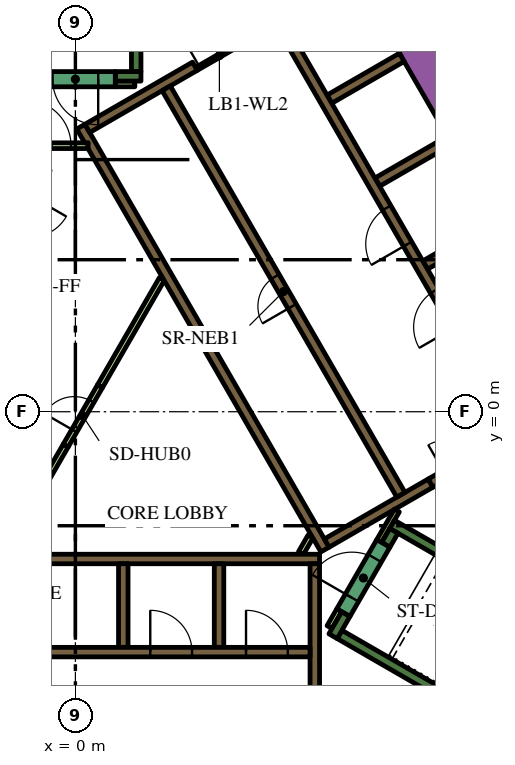
"""IFC4 building model, lengths in metres.
Left out: names, types, materials, properties, quantities, classifications, styles, units other than length and angle.
Written with IfcOpenShell. Run it as: python <this file> out.ifc"""

import sys

from ifc_helpers import new_model, si_unit, direction, frame, frame_2d, origin, place, context, subcontext, project, spatial, polyline, rectangle, outline, extrude, element, fill, save


model = new_model("IFC4")
c1 = context("Model", 3, precision=1e-05, world=origin(), true_north=direction((0.0, 1.0)))
c2 = subcontext(c1, "Body", "Model", "MODEL_VIEW")
j1 = project(units=[si_unit("LENGTHUNIT", "METRE"), si_unit("PLANEANGLEUNIT", "RADIAN")], contexts=[c1])
p1 = place(None, origin())
s1 = spatial("IfcSite", under=j1, at=p1, CompositionType="ELEMENT")
p2 = place(p1, origin())
s2 = spatial("IfcBuilding", under=s1, at=p2, CompositionType="ELEMENT")
p3 = place(p2, frame((0.0, 0.0, 83.7)))
s3 = spatial("IfcBuildingStorey", under=s2, at=p3, CompositionType="ELEMENT", Elevation=83.7)
p4 = place(p3, frame((6.776, 13.364, 0.0), z_axis=(0.0, 0.0, 1.0), x_axis=(0.500004177138, -0.8660229921, 0.0)))
e1 = element("IfcWall", 1, at=p4, inside=s3, PredefinedType="SOLIDWALL", context=c2, shape_type="SweptSolid", body=[
    extrude(rectangle(XDim=20.204, YDim=0.9, at=frame_2d((10.102, 0.0))), origin(), (0.0, 0.0, 1.0), 3.9),
])
p5 = place(p3, frame((12.84, -9.261, 0.0), z_axis=(0.0, 0.0, 1.0), x_axis=(-0.866013990052, 0.500019768644, 0.0)))
e2 = element("IfcWall", 2, at=p5, inside=s3, PredefinedType="SOLIDWALL", context=c2, shape_type="SweptSolid", body=[
    extrude(rectangle(XDim=6.8, YDim=0.25, at=frame_2d((3.4, 0.0))), origin(), (0.0, 0.0, 1.0), 3.9),
])
p6 = place(p3, frame((6.78, -5.906, 0.0), z_axis=(0.0, 0.0, 1.0), x_axis=(0.500223362819, 0.865896406789, 0.0)))
e3 = element("IfcWall", 3, at=p6, inside=s3, PredefinedType="SOLIDWALL", context=c2, shape_type="SweptSolid", body=[
    extrude(rectangle(XDim=0.675, YDim=0.25, at=frame_2d((0.337, 0.0))), origin(), (0.0, 0.0, 1.0), 3.9),
])
p7 = place(p3, frame((8.334, -2.964, 0.0), z_axis=(0.0, 0.0, 1.0), x_axis=(0.866016039709, -0.500016218704, 0.0)))
e4 = element("IfcWall", 4, at=p7, inside=s3, PredefinedType="SOLIDWALL", context=c2, shape_type="SweptSolid", body=[
    extrude(rectangle(XDim=7.05, YDim=0.25, at=frame_2d((3.525, 0.0))), origin(), (0.0, 0.0, 1.0), 3.9),
])
p8 = place(p3, frame((8.168, -3.503, 0.0), z_axis=(0.0, 0.0, 1.0), x_axis=(0.49972245349, 0.866185586049, 0.0)))
e5 = element("IfcWall", 5, at=p8, inside=s3, PredefinedType="SOLIDWALL", context=c2, shape_type="SweptSolid", body=[
    extrude(rectangle(XDim=0.425, YDim=0.25, at=frame_2d((0.212, 0.0))), origin(), (0.0, 0.0, 1.0), 3.9),
])
p9 = place(p3, frame((1.6, 8.95, 0.0), z_axis=(0.0, 0.0, 1.0), x_axis=(0.0, 1.0, 0.0)))
e6 = element("IfcWall", 6, at=p9, inside=s3, PredefinedType="SOLIDWALL", context=c2, shape_type="SweptSolid", body=[
    extrude(rectangle(XDim=6.8, YDim=0.25, at=frame_2d((3.4, 0.0))), origin(), (0.0, 0.0, 1.0), 3.9),
])
p10 = place(p3, frame((1.05, 8.825, 0.0), z_axis=(0.0, 0.0, 1.0), x_axis=(1.0, 0.0, 0.0)))
e7 = element("IfcWall", 7, at=p10, inside=s3, PredefinedType="SOLIDWALL", context=c2, shape_type="SweptSolid", body=[
    extrude(rectangle(XDim=0.675, YDim=0.25, at=frame_2d((0.337, 0.0))), origin(), (0.0, 0.0, 1.0), 3.9),
])
p11 = place(p3, frame((-5.845, -3.875, 0.0), z_axis=(0.0, 0.0, 1.0), x_axis=(1.0, 0.0, 0.0)))
e8 = element("IfcWall", 8, at=p11, inside=s3, PredefinedType="SOLIDWALL", context=c2, shape_type="SweptSolid", body=[
    extrude(rectangle(XDim=12.27, YDim=0.25, at=frame_2d((6.135, 0.0))), origin(), (0.0, 0.0, 1.0), 3.9),
])
p12 = place(p3, frame((6.3, -7.268, 0.0), z_axis=(0.0, 0.0, 1.0), x_axis=(0.0, 1.0, 0.0)))
e9 = element("IfcWall", 9, at=p12, inside=s3, PredefinedType="SOLIDWALL", context=c2, shape_type="SweptSolid", body=[
    extrude(rectangle(XDim=3.268, YDim=0.25, at=frame_2d((1.634, 0.0))), origin(), (0.0, 0.0, 1.0), 3.9),
])
for number, where, z_axis, x_axis in (
    (10, (3.78, -4.0, 0.0), (0.0, 0.0, 1.0), (0.0, -1.0, 0.0)),
    (11, (1.26, -4.0, 0.0), (0.0, 0.0, 1.0), (0.0, -1.0, 0.0)),
):
    element("IfcWall", number, at=place(p3, frame(where, z_axis=z_axis, x_axis=x_axis)), inside=s3, PredefinedType="SOLIDWALL", context=c2, shape_type="SweptSolid", body=[
        extrude(rectangle(XDim=2.2, YDim=0.25, at=frame_2d((1.1, 0.0))), origin(), (0.0, 0.0, 1.0), 3.9),
    ])
p13 = place(p3, origin())
e12 = element("IfcWall", 12, at=p13, inside=s3, PredefinedType="SOLIDWALL", context=c2, shape_type="SweptSolid", body=[
    extrude(outline(polyline([(0.335, 6.925), (0.335, 7.075), (0.335, 7.075), (0.335, 7.075), (0.245, 7.075), (0.079, 7.363), (0.035, 7.439), (0.252, 7.564), (0.377, 7.348), (6.552, -3.348), (6.677, -3.564), (6.46, -3.689), (4.897, -0.981), (0.332, 6.925), (0.335, 6.925), (0.335, 6.925), (0.335, 6.925)])), origin(), (0.0, 0.0, 1.0), 3.9),
])
p14 = place(p3, frame((0.314, 7.456, 0.0), z_axis=(0.0, 0.0, 1.0), x_axis=(0.866013897511, 0.50001992892, 0.0)))
e13 = element("IfcWall", 13, at=p14, inside=s3, PredefinedType="SOLIDWALL", context=c2, shape_type="SweptSolid", body=[
    extrude(rectangle(XDim=3.268, YDim=0.25, at=frame_2d((1.634, 0.0))), origin(), (0.0, 0.0, 1.0), 3.9),
])
p15 = place(p3, frame((6.614, -3.456, 0.0), z_axis=(0.0, 0.0, 1.0), x_axis=(0.86602447079, 0.500001615989, 0.0)))
e14 = element("IfcWall", 14, at=p15, inside=s3, PredefinedType="SOLIDWALL", context=c2, shape_type="SweptSolid", body=[
    extrude(rectangle(XDim=3.154, YDim=0.25, at=frame_2d((1.577, 0.0))), origin(), (0.0, 0.0, 1.0), 3.9),
])
for number, where, z_axis, x_axis in (
    (15, (6.684, 8.224, 0.0), (0.0, 0.0, 1.0), (0.866, 0.5, 0.0)),
    (16, (7.944, 6.041, 0.0), (0.0, 0.0, 1.0), (0.866, 0.5, 0.0)),
    (17, (9.204, 3.859, 0.0), (0.0, 0.0, 1.0), (0.866, 0.5, 0.0)),
):
    element("IfcWall", number, at=place(p3, frame(where, z_axis=z_axis, x_axis=x_axis)), inside=s3, PredefinedType="SOLIDWALL", context=c2, shape_type="SweptSolid", body=[
        extrude(rectangle(XDim=2.2, YDim=0.25, at=frame_2d((1.1, 0.0))), origin(), (0.0, 0.0, 1.0), 3.9),
    ])
p16 = place(p3, frame((6.945, -5.222, 0.0), z_axis=(0.0, 0.0, 1.0), x_axis=(-0.499818422106, -0.866130212453, 0.0)))
e18 = element("IfcWall", 18, at=p16, inside=s3, PredefinedType="PARTITIONING", context=c2, shape_type="SweptSolid", body=[
    extrude(rectangle(XDim=0.514, YDim=0.15, at=frame_2d((0.257, 0.0))), origin(), (0.0, 0.0, 1.0), 2.75),
])
p17 = place(p3, frame((5.936, -3.718, 0.0), z_axis=(0.0, 0.0, 1.0), x_axis=(0.499890179513, 0.866088799389, 0.0)))
e19 = element("IfcWall", 19, at=p17, inside=s3, PredefinedType="PARTITIONING", context=c2, shape_type="SweptSolid", body=[
    extrude(rectangle(XDim=0.504, YDim=0.15, at=frame_2d((0.252, 0.0))), origin(), (0.0, 0.0, 1.0), 2.75),
])
p18 = place(p3, frame((8.459, -2.599, 0.0), z_axis=(0.0, 0.0, 1.0), x_axis=(-0.500041054325, -0.866001699761, 0.0)))
e20 = element("IfcWall", 20, at=p18, inside=s3, PredefinedType="PARTITIONING", context=c2, shape_type="SweptSolid", body=[
    extrude(rectangle(XDim=0.929, YDim=0.15, at=frame_2d((0.464, 0.0))), origin(), (0.0, 0.0, 1.0), 3.9),
])
for number, where, z_axis, x_axis in (
    (21, (-1.887, -3.718, 0.0), (0.0, 0.0, 1.0), (0.5, 0.866, 0.0)),
    (22, (0.645, 0.667, 0.0), (0.0, 0.0, 1.0), (0.5, 0.866, 0.0)),
):
    element("IfcWall", number, at=place(p3, frame(where, z_axis=z_axis, x_axis=x_axis)), inside=s3, PredefinedType="PARTITIONING", context=c2, shape_type="SweptSolid", body=[
        extrude(rectangle(XDim=3.263, YDim=0.15, at=frame_2d((1.632, 0.0))), origin(), (0.0, 0.0, 1.0), 2.75),
    ])
p19 = place(p3, frame((1.05, 8.625, 0.0), z_axis=(0.0, 0.0, 1.0), x_axis=(1.0, 0.0, 0.0)))
e23 = element("IfcWall", 23, at=p19, inside=s3, PredefinedType="PARTITIONING", context=c2, shape_type="SweptSolid", body=[
    extrude(rectangle(XDim=0.514, YDim=0.15, at=frame_2d((0.257, 0.0))), origin(), (0.0, 0.0, 1.0), 2.75),
])
p20 = place(p3, frame((-6.175, -6.325, 0.0), z_axis=(0.0, 0.0, 1.0), x_axis=(1.0, 0.0, 0.0)))
e24 = element("IfcWall", 24, at=p20, inside=s3, PredefinedType="SOLIDWALL", context=c2, shape_type="SweptSolid", body=[
    extrude(rectangle(XDim=12.35, YDim=0.25, at=frame_2d((6.175, 0.0))), origin(), (0.0, 0.0, 1.0), 3.9),
])
p21 = place(p20, frame((3.205, 0.0, 0.0)))
e25 = element("IfcOpeningElement", 25, at=p21, cuts=e24, PredefinedType="OPENING", context=c2, shape_type="SweptSolid", body=[
    extrude(rectangle(XDim=0.9, YDim=2.1, at=frame_2d((0.45, 1.05))), frame((0.0, 0.135, 0.0), z_axis=(0.0, -1.0, 0.0), x_axis=(1.0, 0.0, 0.0)), (0.0, 0.0, 1.0), 0.27),
])
p22 = place(p20, frame((8.145, 0.0, 0.0)))
e26 = element("IfcOpeningElement", 26, at=p22, cuts=e24, PredefinedType="OPENING", context=c2, shape_type="SweptSolid", body=[
    extrude(rectangle(XDim=1.1, YDim=2.1, at=frame_2d((0.55, 1.05))), frame((0.0, 0.135, 0.0), z_axis=(0.0, -1.0, 0.0), x_axis=(1.0, 0.0, 0.0)), (0.0, 0.0, 1.0), 0.27),
])
p23 = place(p20, frame((10.665, 0.0, 0.0)))
e27 = element("IfcOpeningElement", 27, at=p23, cuts=e24, PredefinedType="OPENING", context=c2, shape_type="SweptSolid", body=[
    extrude(rectangle(XDim=1.1, YDim=2.1, at=frame_2d((0.55, 1.05))), frame((0.0, 0.135, 0.0), z_axis=(0.0, -1.0, 0.0), x_axis=(1.0, 0.0, 0.0)), (0.0, 0.0, 1.0), 0.27),
])
p24 = place(p3, frame((11.553, -0.46, 0.0), z_axis=(0.0, 0.0, 1.0), x_axis=(-0.500006514828, 0.866021642414, 0.0)))
e28 = element("IfcWall", 28, at=p24, inside=s3, PredefinedType="SOLIDWALL", context=c2, shape_type="SweptSolid", body=[
    extrude(rectangle(XDim=12.35, YDim=0.25, at=frame_2d((6.175, 0.0))), origin(), (0.0, 0.0, 1.0), 3.9),
])
p25 = place(p24, frame((0.585, 0.0, 0.0)))
e29 = element("IfcOpeningElement", 29, at=p25, cuts=e28, PredefinedType="OPENING", context=c2, shape_type="SweptSolid", body=[
    extrude(rectangle(XDim=1.1, YDim=2.1, at=frame_2d((0.55, 1.05))), frame((0.0, 0.135, 0.0), z_axis=(0.0, -1.0, 0.0), x_axis=(1.0, 0.0, 0.0)), (0.0, 0.0, 1.0), 0.27),
])
p26 = place(p24, frame((3.105, 0.0, 0.0)))
e30 = element("IfcOpeningElement", 30, at=p26, cuts=e28, PredefinedType="OPENING", context=c2, shape_type="SweptSolid", body=[
    extrude(rectangle(XDim=1.1, YDim=2.1, at=frame_2d((0.55, 1.05))), frame((0.0, 0.135, 0.0), z_axis=(0.0, -1.0, 0.0), x_axis=(1.0, 0.0, 0.0)), (0.0, 0.0, 1.0), 0.27),
])
p27 = place(p24, frame((5.625, 0.0, 0.0)))
e31 = element("IfcOpeningElement", 31, at=p27, cuts=e28, PredefinedType="OPENING", context=c2, shape_type="SweptSolid", body=[
    extrude(rectangle(XDim=1.1, YDim=2.1, at=frame_2d((0.55, 1.05))), frame((0.0, 0.135, 0.0), z_axis=(0.0, -1.0, 0.0), x_axis=(1.0, 0.0, 0.0)), (0.0, 0.0, 1.0), 0.27),
])
p28 = place(p3, frame((8.565, -2.185, 0.0), z_axis=(0.0, 0.0, 1.0), x_axis=(-0.499997954832, 0.866026584559, 0.0)))
e32 = element("IfcWall", 32, at=p28, inside=s3, PredefinedType="SOLIDWALL", context=c2, shape_type="SweptSolid", body=[
    extrude(rectangle(XDim=12.35, YDim=0.25, at=frame_2d((6.175, 0.0))), origin(), (0.0, 0.0, 1.0), 3.9),
])
p29 = place(p28, frame((5.725, 0.0, 0.0)))
e33 = element("IfcOpeningElement", 33, at=p29, cuts=e32, PredefinedType="OPENING", context=c2, shape_type="SweptSolid", body=[
    extrude(rectangle(XDim=0.9, YDim=2.1, at=frame_2d((0.45, 1.05))), frame((0.0, 0.135, 0.0), z_axis=(0.0, -1.0, 0.0), x_axis=(1.0, 0.0, 0.0)), (0.0, 0.0, 1.0), 0.27),
])
p30 = place(p3, frame((7.053, -5.284, 0.0), z_axis=(0.0, 0.0, 1.0), x_axis=(0.500078061341, 0.865980330357, 0.0)))
e34 = element("IfcWall", 34, at=p30, inside=s3, PredefinedType="SOLIDWALL", context=c2, shape_type="SweptSolid", body=[
    extrude(rectangle(XDim=2.1, YDim=0.4, at=frame_2d((1.05, 0.0))), origin(), (0.0, 0.0, 1.0), 3.9),
])
p31 = place(p30, frame((0.45, 0.0, 0.0)))
e35 = element("IfcOpeningElement", 35, at=p31, cuts=e34, PredefinedType="OPENING", context=c2, shape_type="SweptSolid", body=[
    extrude(rectangle(XDim=1.2, YDim=2.1, at=frame_2d((0.6, 1.05))), frame((0.0, 0.21, 0.0), z_axis=(0.0, -1.0, 0.0), x_axis=(1.0, 0.0, 0.0)), (0.0, 0.0, 1.0), 0.42),
])
p32 = place(p3, frame((9.346, -1.879, 0.0), z_axis=(0.0, 0.0, 1.0), x_axis=(0.866047807691, 0.499961193289, 0.0)))
e36 = element("IfcWall", 36, at=p32, inside=s3, PredefinedType="SOLIDWALL", context=c2, shape_type="SweptSolid", body=[
    extrude(rectangle(XDim=1.8, YDim=0.25, at=frame_2d((0.9, 0.0))), origin(), (0.0, 0.0, 1.0), 3.9),
])
p33 = place(p32, frame((0.45, 0.0, 0.0)))
e37 = element("IfcOpeningElement", 37, at=p33, cuts=e36, PredefinedType="OPENING", context=c2, shape_type="SweptSolid", body=[
    extrude(rectangle(XDim=0.9, YDim=2.1, at=frame_2d((0.45, 1.05))), frame((0.0, 0.135, 0.0), z_axis=(0.0, -1.0, 0.0), x_axis=(1.0, 0.0, 0.0)), (0.0, 0.0, 1.0), 0.27),
])
p34 = place(p3, frame((1.05, 8.75, 0.0), z_axis=(0.0, 0.0, 1.0), x_axis=(-1.0, 0.0, 0.0)))
e38 = element("IfcWall", 38, at=p34, inside=s3, PredefinedType="SOLIDWALL", context=c2, shape_type="SweptSolid", body=[
    extrude(rectangle(XDim=2.1, YDim=0.4, at=frame_2d((1.05, 0.0))), origin(), (0.0, 0.0, 1.0), 3.9),
])
p35 = place(p34, frame((0.45, 0.0, 0.0)))
e39 = element("IfcOpeningElement", 39, at=p35, cuts=e38, PredefinedType="OPENING", context=c2, shape_type="SweptSolid", body=[
    extrude(rectangle(XDim=1.2, YDim=2.1, at=frame_2d((0.6, 1.05))), frame((0.0, 0.21, 0.0), z_axis=(0.0, -1.0, 0.0), x_axis=(1.0, 0.0, 0.0)), (0.0, 0.0, 1.0), 0.42),
])
p36 = place(p3, frame((-1.765, 7.0, 0.0), z_axis=(0.0, 0.0, 1.0), x_axis=(1.0, 0.0, 0.0)))
e40 = element("IfcWall", 40, at=p36, inside=s3, PredefinedType="PARTITIONING", context=c2, shape_type="SweptSolid", body=[
    extrude(rectangle(XDim=2.1, YDim=0.15, at=frame_2d((1.05, 0.0))), origin(), (0.0, 0.0, 1.0), 2.75),
])
p37 = place(p36, frame((0.45, 0.0, 0.0)))
e41 = element("IfcOpeningElement", 41, at=p37, cuts=e40, PredefinedType="OPENING", context=c2, shape_type="SweptSolid", body=[
    extrude(rectangle(XDim=1.2, YDim=2.1, at=frame_2d((0.6, 1.05))), frame((0.0, 0.085, 0.0), z_axis=(0.0, -1.0, 0.0), x_axis=(1.0, 0.0, 0.0)), (0.0, 0.0, 1.0), 0.17),
])
p38 = place(p3, frame((3.183, 9.02, 0.0), z_axis=(0.0, 0.0, 1.0), x_axis=(0.866034573852, 0.49998411664, 0.0)))
e42 = element("IfcWall", 42, at=p38, inside=s3, PredefinedType="PARTITIONING", context=c2, shape_type="SweptSolid", body=[
    extrude(rectangle(XDim=1.4, YDim=0.09, at=frame_2d((0.7, 0.0))), origin(), (0.0, 0.0, 1.0), 2.75),
])
p39 = place(p38, frame((0.1, 0.0, 0.0)))
e43 = element("IfcOpeningElement", 43, at=p39, cuts=e42, PredefinedType="OPENING", context=c2, shape_type="SweptSolid", body=[
    extrude(rectangle(XDim=1.2, YDim=2.1, at=frame_2d((0.6, 1.05))), frame((0.0, 0.055, 0.0), z_axis=(0.0, -1.0, 0.0), x_axis=(1.0, 0.0, 0.0)), (0.0, 0.0, 1.0), 0.11),
])
p40 = place(p3, frame((-0.255, -0.892, 0.0), z_axis=(0.0, 0.0, 1.0), x_axis=(0.500062916607, 0.865989075817, 0.0)))
e44 = element("IfcWall", 44, at=p40, inside=s3, PredefinedType="PARTITIONING", context=c2, shape_type="SweptSolid", body=[
    extrude(rectangle(XDim=1.8, YDim=0.15, at=frame_2d((0.9, 0.0))), origin(), (0.0, 0.0, 1.0), 2.75),
])
p41 = place(p40, frame((0.45, 0.0, 0.0)))
e45 = element("IfcOpeningElement", 45, at=p41, cuts=e44, PredefinedType="OPENING", context=c2, shape_type="SweptSolid", body=[
    extrude(rectangle(XDim=0.9, YDim=2.1, at=frame_2d((0.45, 1.05))), frame((0.0, 0.085, 0.0), z_axis=(0.0, -1.0, 0.0), x_axis=(1.0, 0.0, 0.0)), (0.0, 0.0, 1.0), 0.17),
])
p42 = place(p3, frame((6.163, 18.475, 0.0), z_axis=(0.0, 0.0, 1.0), x_axis=(0.500001317485, -0.866024643133, 0.0)))
e46 = element("IfcWall", 46, at=p42, inside=s3, PredefinedType="PARTITIONING", context=c2, shape_type="SweptSolid", body=[
    extrude(rectangle(XDim=25.767, YDim=0.15, at=frame_2d((12.883, 0.0))), origin(), (0.0, 0.0, 1.0), 2.75),
])
p43 = place(p42, frame((24.241, 0.0, 0.0)))
e47 = element("IfcOpeningElement", 47, at=p43, cuts=e46, PredefinedType="OPENING", context=c2, shape_type="SweptSolid", body=[
    extrude(rectangle(XDim=1.0, YDim=2.1, at=frame_2d((0.5, 1.05))), frame((0.0, 0.085, 0.0), z_axis=(0.0, -1.0, 0.0), x_axis=(1.0, 0.0, 0.0)), (0.0, 0.0, 1.0), 0.17),
])
p44 = place(p42, frame((13.144, 0.0, 0.0)))
e48 = element("IfcOpeningElement", 48, at=p44, cuts=e46, PredefinedType="OPENING", context=c2, shape_type="SweptSolid", body=[
    extrude(rectangle(XDim=1.0, YDim=2.1, at=frame_2d((0.5, 1.05))), frame((0.0, 0.085, 0.0), z_axis=(0.0, -1.0, 0.0), x_axis=(1.0, 0.0, 0.0)), (0.0, 0.0, 1.0), 0.17),
])
p45 = place(p42, frame((10.874, 0.0, 0.0)))
e49 = element("IfcOpeningElement", 49, at=p45, cuts=e46, PredefinedType="OPENING", context=c2, shape_type="SweptSolid", body=[
    extrude(rectangle(XDim=0.9, YDim=2.1, at=frame_2d((0.45, 1.05))), frame((0.0, 0.085, 0.0), z_axis=(0.0, -1.0, 0.0), x_axis=(1.0, 0.0, 0.0)), (0.0, 0.0, 1.0), 0.17),
])
p46 = place(p42, frame((3.718, 0.0, 0.0)))
e50 = element("IfcOpeningElement", 50, at=p46, cuts=e46, PredefinedType="OPENING", context=c2, shape_type="SweptSolid", body=[
    extrude(rectangle(XDim=1.1, YDim=2.1, at=frame_2d((0.55, 1.05))), frame((0.0, 0.085, 0.0), z_axis=(0.0, -1.0, 0.0), x_axis=(1.0, 0.0, 0.0)), (0.0, 0.0, 1.0), 0.17),
])
p47 = place(p42, frame((2.411, 0.0, 0.0)))
e51 = element("IfcOpeningElement", 51, at=p47, cuts=e46, PredefinedType="OPENING", context=c2, shape_type="SweptSolid", body=[
    extrude(rectangle(XDim=1.0, YDim=2.1, at=frame_2d((0.5, 1.05))), frame((0.0, 0.085, 0.0), z_axis=(0.0, -1.0, 0.0), x_axis=(1.0, 0.0, 0.0)), (0.0, 0.0, 1.0), 0.17),
])
p48 = place(p22, origin())
e52 = element("IfcDoor", 52, at=p48, inside=s3, OperationType="DOUBLE_DOOR_SLIDING", PredefinedType="DOOR", context=c2, shape_type="SweptSolid", body=[
    extrude(rectangle(XDim=1.1, YDim=2.1, at=frame_2d((0.55, 1.05))), frame((0.0, 0.025, 0.0), z_axis=(0.0, -1.0, 0.0), x_axis=(1.0, 0.0, 0.0)), (0.0, 0.0, 1.0), 0.05),
])
fill(e26, e52)
p49 = place(p23, origin())
e53 = element("IfcDoor", 53, at=p49, inside=s3, OperationType="DOUBLE_DOOR_SLIDING", PredefinedType="DOOR", context=c2, shape_type="SweptSolid", body=[
    extrude(rectangle(XDim=1.1, YDim=2.1, at=frame_2d((0.55, 1.05))), frame((0.0, 0.025, 0.0), z_axis=(0.0, -1.0, 0.0), x_axis=(1.0, 0.0, 0.0)), (0.0, 0.0, 1.0), 0.05),
])
fill(e27, e53)
p50 = place(p26, origin())
e54 = element("IfcDoor", 54, at=p50, inside=s3, OperationType="DOUBLE_DOOR_SLIDING", PredefinedType="DOOR", context=c2, shape_type="SweptSolid", body=[
    extrude(rectangle(XDim=1.1, YDim=2.1, at=frame_2d((0.55, 1.05))), frame((0.0, 0.025, 0.0), z_axis=(0.0, -1.0, 0.0), x_axis=(1.0, 0.0, 0.0)), (0.0, 0.0, 1.0), 0.05),
])
fill(e30, e54)
p51 = place(p27, origin())
e55 = element("IfcDoor", 55, at=p51, inside=s3, OperationType="DOUBLE_DOOR_SLIDING", PredefinedType="DOOR", context=c2, shape_type="SweptSolid", body=[
    extrude(rectangle(XDim=1.1, YDim=2.1, at=frame_2d((0.55, 1.05))), frame((0.0, 0.025, 0.0), z_axis=(0.0, -1.0, 0.0), x_axis=(1.0, 0.0, 0.0)), (0.0, 0.0, 1.0), 0.05),
])
fill(e31, e55)
p52 = place(p29, origin())
e56 = element("IfcDoor", 56, at=p52, inside=s3, OperationType="SINGLE_SWING_LEFT", PredefinedType="DOOR", context=c2, shape_type="SweptSolid", body=[
    extrude(rectangle(XDim=0.9, YDim=2.1, at=frame_2d((0.45, 1.05))), frame((0.0, 0.025, 0.0), z_axis=(0.0, -1.0, 0.0), x_axis=(1.0, 0.0, 0.0)), (0.0, 0.0, 1.0), 0.05),
])
fill(e33, e56)
p53 = place(p31, origin())
e57 = element("IfcDoor", 57, at=p53, inside=s3, OperationType="SINGLE_SWING_LEFT", PredefinedType="DOOR", context=c2, shape_type="SweptSolid", body=[
    extrude(rectangle(XDim=1.2, YDim=2.1, at=frame_2d((0.6, 1.05))), frame((0.0, 0.025, 0.0), z_axis=(0.0, -1.0, 0.0), x_axis=(1.0, 0.0, 0.0)), (0.0, 0.0, 1.0), 0.05),
])
fill(e35, e57)
p54 = place(p35, origin())
e58 = element("IfcDoor", 58, at=p54, inside=s3, OperationType="SINGLE_SWING_LEFT", PredefinedType="DOOR", context=c2, shape_type="SweptSolid", body=[
    extrude(rectangle(XDim=1.2, YDim=2.1, at=frame_2d((0.6, 1.05))), frame((0.0, 0.025, 0.0), z_axis=(0.0, -1.0, 0.0), x_axis=(1.0, 0.0, 0.0)), (0.0, 0.0, 1.0), 0.05),
])
fill(e39, e58)
p55 = place(p37, origin())
e59 = element("IfcDoor", 59, at=p55, inside=s3, OperationType="SINGLE_SWING_LEFT", PredefinedType="DOOR", context=c2, shape_type="SweptSolid", body=[
    extrude(rectangle(XDim=1.2, YDim=2.1, at=frame_2d((0.6, 1.05))), frame((0.0, 0.025, 0.0), z_axis=(0.0, -1.0, 0.0), x_axis=(1.0, 0.0, 0.0)), (0.0, 0.0, 1.0), 0.05),
])
fill(e41, e59)
p56 = place(p39, origin())
e60 = element("IfcDoor", 60, at=p56, inside=s3, OperationType="SINGLE_SWING_LEFT", PredefinedType="DOOR", context=c2, shape_type="SweptSolid", body=[
    extrude(rectangle(XDim=1.2, YDim=2.1, at=frame_2d((0.6, 1.05))), frame((0.0, 0.025, 0.0), z_axis=(0.0, -1.0, 0.0), x_axis=(1.0, 0.0, 0.0)), (0.0, 0.0, 1.0), 0.05),
])
fill(e43, e60)
p57 = place(p41, origin())
e61 = element("IfcDoor", 61, at=p57, inside=s3, OperationType="SINGLE_SWING_LEFT", PredefinedType="DOOR", context=c2, shape_type="SweptSolid", body=[
    extrude(rectangle(XDim=0.9, YDim=2.1, at=frame_2d((0.45, 1.05))), frame((0.0, 0.025, 0.0), z_axis=(0.0, -1.0, 0.0), x_axis=(1.0, 0.0, 0.0)), (0.0, 0.0, 1.0), 0.05),
])
fill(e45, e61)
save(model, sys.argv[1])
